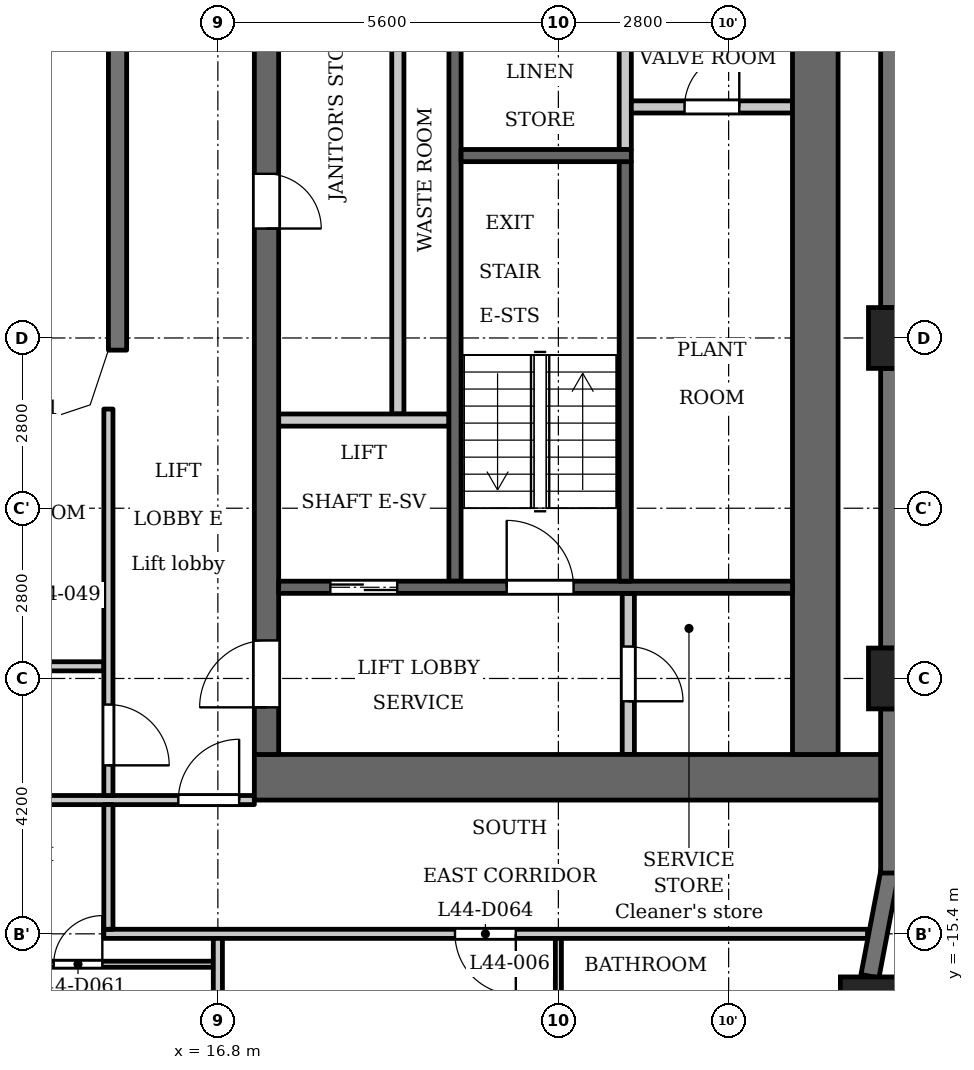
"""IFC4 building model, lengths in metres.
Left out: names, types, materials, properties, quantities, classifications, styles, units other than length and angle.
Written with IfcOpenShell. Run it as: python <this file> out.ifc"""

import sys

from ifc_helpers import new_model, si_unit, direction, frame, frame_2d, origin, origin_2d, place, context, subcontext, project, spatial, polyline, rectangle, outline, extrude, element, fill, save


model = new_model("IFC4")
c1 = context("Model", 3, precision=1e-05, world=origin(), true_north=direction((0.0, 1.0)))
c2 = subcontext(c1, "Body", "Model", "MODEL_VIEW")
j1 = project(units=[si_unit("LENGTHUNIT", "METRE"), si_unit("PLANEANGLEUNIT", "RADIAN")], contexts=[c1])
p1 = place(None, origin())
s1 = spatial("IfcSite", under=j1, at=p1, CompositionType="ELEMENT")
p2 = place(p1, origin())
s2 = spatial("IfcBuilding", under=s1, at=p2, CompositionType="ELEMENT")
p3 = place(p2, frame((0.0, 0.0, 171.1)))
s3 = spatial("IfcBuildingStorey", under=s2, at=p3, CompositionType="ELEMENT", Elevation=171.1)
for number, where, z_axis, x_axis in (
    (1, (27.538, -16.609, 0.0), (0.0, 0.0, 1.0), (1.0, 0.0, 0.0)),
    (2, (28.0, -11.2, 0.0), (0.0, 0.0, 1.0), (1.0, 0.0, 0.0)),
    (3, (28.0, -5.6, 0.0), (0.0, 0.0, 1.0), (1.0, 0.0, 0.0)),
):
    element("IfcColumn", number, at=place(p3, frame(where, z_axis=z_axis, x_axis=x_axis)), inside=s3, PredefinedType="COLUMN", context=c2, shape_type="SweptSolid", body=[
        extrude(rectangle(XDim=1.0, YDim=1.0, at=origin_2d()), origin(), (0.0, 0.0, 1.0), 3.5),
    ])
p4 = place(p3, frame((27.524, -16.097, 0.0), z_axis=(0.0, 0.0, 1.0), x_axis=(0.187259034321, 0.982310569049, 0.0)))
e4 = element("IfcWall", 4, at=p4, inside=s3, PredefinedType="SOLIDWALL", context=c2, shape_type="SweptSolid", body=[
    extrude(rectangle(XDim=1.756, YDim=0.3, at=frame_2d((0.878, 0.0))), origin(), (0.0, 0.0, 1.0), 2.45),
])
p5 = place(p3, frame((27.85, -14.4, 0.0), z_axis=(0.0, 0.0, 1.0), x_axis=(0.0, 1.0, 0.0)))
e5 = element("IfcWall", 5, at=p5, inside=s3, PredefinedType="SOLIDWALL", context=c2, shape_type="SweptSolid", body=[
    extrude(rectangle(XDim=2.7, YDim=0.3, at=frame_2d((1.35, 0.0))), origin(), (0.0, 0.0, 1.0), 2.45),
])
p6 = place(p3, frame((27.85, -10.7, 0.0), z_axis=(0.0, 0.0, 1.0), x_axis=(0.0, 1.0, 0.0)))
e6 = element("IfcWall", 6, at=p6, inside=s3, PredefinedType="SOLIDWALL", context=c2, shape_type="SweptSolid", body=[
    extrude(rectangle(XDim=4.6, YDim=0.3, at=frame_2d((2.3, 0.0))), origin(), (0.0, 0.0, 1.0), 2.45),
])
p7 = place(p3, frame((27.85, -5.1, 0.0), z_axis=(0.0, 0.0, 1.0), x_axis=(0.0, 1.0, 0.0)))
e7 = element("IfcWall", 7, at=p7, inside=s3, PredefinedType="SOLIDWALL", context=c2, shape_type="SweptSolid", body=[
    extrude(rectangle(XDim=4.6, YDim=0.3, at=frame_2d((2.3, 0.0))), origin(), (0.0, 0.0, 1.0), 2.45),
])
p8 = place(p3, frame((15.15, 5.8, 0.0), z_axis=(0.0, 0.0, 1.0), x_axis=(0.0, -1.0, 0.0)))
e8 = element("IfcWall", 8, at=p8, inside=s3, PredefinedType="SOLIDWALL", context=c2, shape_type="SweptSolid", body=[
    extrude(rectangle(XDim=11.6, YDim=0.3, at=frame_2d((5.8, 0.0))), origin(), (0.0, 0.0, 1.0), 3.2),
])
p9 = place(p3, frame((23.5, -2.5, 0.0), z_axis=(0.0, 0.0, 1.0), x_axis=(0.0, 1.0, 0.0)))
e9 = element("IfcWall", 9, at=p9, inside=s3, PredefinedType="PARTITIONING", context=c2, shape_type="SweptSolid", body=[
    extrude(rectangle(XDim=2.65, YDim=0.2, at=frame_2d((1.325, 0.0))), origin(), (0.0, 0.0, 1.0), 3.2),
])
p10 = place(p3, frame((20.7, -9.6, 0.0), z_axis=(0.0, 0.0, 1.0), x_axis=(0.0, 1.0, 0.0)))
e10 = element("IfcWall", 10, at=p10, inside=s3, PredefinedType="SHEAR", context=c2, shape_type="SweptSolid", body=[
    extrude(rectangle(XDim=9.75, YDim=0.2, at=frame_2d((4.875, 0.0))), origin(), (0.0, 0.0, 1.0), 3.2),
])
p11 = place(p3, frame((17.4, -12.825, 0.0), z_axis=(0.0, 0.0, 1.0), x_axis=(1.0, 0.0, 0.0)))
e11 = element("IfcWall", 11, at=p11, inside=s3, PredefinedType="SHEAR", context=c2, shape_type="SweptSolid", body=[
    extrude(rectangle(XDim=10.4, YDim=0.75, at=frame_2d((5.2, 0.0))), origin(), (0.0, 0.0, 1.0), 3.2),
])
p12 = place(p3, frame((19.76, -6.85, 0.0), z_axis=(0.0, 0.0, 1.0), x_axis=(0.0, 1.0, 0.0)))
e12 = element("IfcWall", 12, at=p12, inside=s3, PredefinedType="PARTITIONING", context=c2, shape_type="SweptSolid", body=[
    extrude(rectangle(XDim=7.0, YDim=0.2, at=frame_2d((3.5, 0.0))), origin(), (0.0, 0.0, 1.0), 3.2),
])
p13 = place(p3, frame((17.6, -12.45, 0.0), z_axis=(0.0, 0.0, 1.0), x_axis=(0.0, 1.0, 0.0)))
e13 = element("IfcWall", 13, at=p13, inside=s3, PredefinedType="SHEAR", context=c2, shape_type="SweptSolid", body=[
    extrude(rectangle(XDim=24.9, YDim=0.4, at=frame_2d((12.45, 0.0))), origin(), (0.0, 0.0, 1.0), 3.2),
])
p14 = place(p13, frame((8.65, 0.0, 0.0)))
e14 = element("IfcOpeningElement", 14, at=p14, cuts=e13, PredefinedType="OPENING", context=c2, shape_type="SweptSolid", body=[
    extrude(rectangle(XDim=0.9, YDim=2.1, at=frame_2d((0.45, 1.05))), frame((0.0, 0.21, 0.0), z_axis=(0.0, -1.0, 0.0), x_axis=(1.0, 0.0, 0.0)), (0.0, 0.0, 1.0), 0.42),
])
p15 = place(p13, frame((15.6, 0.0, 0.0)))
e15 = element("IfcOpeningElement", 15, at=p15, cuts=e13, PredefinedType="OPENING", context=c2, shape_type="SweptSolid", body=[
    extrude(rectangle(XDim=1.1, YDim=2.1, at=frame_2d((0.55, 1.05))), frame((0.0, 0.21, 0.0), z_axis=(0.0, -1.0, 0.0), x_axis=(1.0, 0.0, 0.0)), (0.0, 0.0, 1.0), 0.42),
])
p16 = place(p13, frame((18.0, 0.0, 0.0)))
e16 = element("IfcOpeningElement", 16, at=p16, cuts=e13, PredefinedType="OPENING", context=c2, shape_type="SweptSolid", body=[
    extrude(rectangle(XDim=1.1, YDim=2.1, at=frame_2d((0.55, 1.05))), frame((0.0, 0.21, 0.0), z_axis=(0.0, -1.0, 0.0), x_axis=(1.0, 0.0, 0.0)), (0.0, 0.0, 1.0), 0.42),
])
p17 = place(p13, frame((23.025, 0.0, 0.0)))
e17 = element("IfcOpeningElement", 17, at=p17, cuts=e13, PredefinedType="OPENING", context=c2, shape_type="SweptSolid", body=[
    extrude(rectangle(XDim=1.1, YDim=2.1, at=frame_2d((0.55, 1.05))), frame((0.0, 0.21, 0.0), z_axis=(0.0, -1.0, 0.0), x_axis=(1.0, 0.0, 0.0)), (0.0, 0.0, 1.0), 0.42),
])
p18 = place(p13, frame((0.775, 0.0, 0.0)))
e18 = element("IfcOpeningElement", 18, at=p18, cuts=e13, PredefinedType="OPENING", context=c2, shape_type="SweptSolid", body=[
    extrude(rectangle(XDim=1.1, YDim=2.1, at=frame_2d((0.55, 1.05))), frame((0.0, 0.21, 0.0), z_axis=(0.0, -1.0, 0.0), x_axis=(1.0, 0.0, 0.0)), (0.0, 0.0, 1.0), 0.42),
])
p19 = place(p13, frame((12.925, 0.0, 0.0)))
e19 = element("IfcOpeningElement", 19, at=p19, cuts=e13, PredefinedType="OPENING", context=c2, shape_type="SweptSolid", body=[
    extrude(rectangle(XDim=1.8, YDim=2.1, at=frame_2d((0.9, 1.05))), frame((0.0, 0.21, 0.0), z_axis=(0.0, -1.0, 0.0), x_axis=(1.0, 0.0, 0.0)), (0.0, 0.0, 1.0), 0.42),
])
p20 = place(p3, frame((26.625, -12.45, 0.0), z_axis=(0.0, 0.0, 1.0), x_axis=(0.0, 1.0, 0.0)))
e20 = element("IfcWall", 20, at=p20, inside=s3, PredefinedType="SHEAR", context=c2, shape_type="SweptSolid", body=[
    extrude(rectangle(XDim=24.9, YDim=0.75, at=frame_2d((12.45, 0.0))), origin(), (0.0, 0.0, 1.0), 3.2),
])
p21 = place(p3, frame((23.55, -12.45, 0.0), z_axis=(0.0, 0.0, 1.0), x_axis=(0.0, 1.0, 0.0)))
e21 = element("IfcWall", 21, at=p21, inside=s3, PredefinedType="PARTITIONING", context=c2, shape_type="SweptSolid", body=[
    extrude(rectangle(XDim=2.65, YDim=0.2, at=frame_2d((1.325, 0.0))), origin(), (0.0, 0.0, 1.0), 3.2),
])
p22 = place(p21, frame((0.875, 0.0, 0.0)))
e22 = element("IfcOpeningElement", 22, at=p22, cuts=e21, PredefinedType="OPENING", context=c2, shape_type="SweptSolid", body=[
    extrude(rectangle(XDim=0.9, YDim=2.1, at=frame_2d((0.45, 1.05))), frame((0.0, 0.11, 0.0), z_axis=(0.0, -1.0, 0.0), x_axis=(1.0, 0.0, 0.0)), (0.0, 0.0, 1.0), 0.22),
])
p23 = place(p3, frame((23.6, -1.8, 0.0), z_axis=(0.0, 0.0, 1.0), x_axis=(1.0, 0.0, 0.0)))
e23 = element("IfcWall", 23, at=p23, inside=s3, PredefinedType="PARTITIONING", context=c2, shape_type="SweptSolid", body=[
    extrude(rectangle(XDim=2.65, YDim=0.2, at=frame_2d((1.325, 0.0))), origin(), (0.0, 0.0, 1.0), 3.2),
])
p24 = place(p23, frame((0.875, 0.0, 0.0)))
e24 = element("IfcOpeningElement", 24, at=p24, cuts=e23, PredefinedType="OPENING", context=c2, shape_type="SweptSolid", body=[
    extrude(rectangle(XDim=0.9, YDim=2.1, at=frame_2d((0.45, 1.05))), frame((0.0, 0.11, 0.0), z_axis=(0.0, -1.0, 0.0), x_axis=(1.0, 0.0, 0.0)), (0.0, 0.0, 1.0), 0.22),
])
p25 = place(p3, frame((17.8, -9.7, 0.0), z_axis=(0.0, 0.0, 1.0), x_axis=(1.0, 0.0, 0.0)))
e25 = element("IfcWall", 25, at=p25, inside=s3, PredefinedType="SHEAR", context=c2, shape_type="SweptSolid", body=[
    extrude(rectangle(XDim=8.45, YDim=0.2, at=frame_2d((4.225, 0.0))), origin(), (0.0, 0.0, 1.0), 3.2),
])
p26 = place(p25, frame((0.85, 0.0, 0.0)))
e26 = element("IfcOpeningElement", 26, at=p26, cuts=e25, PredefinedType="OPENING", context=c2, shape_type="SweptSolid", body=[
    extrude(rectangle(XDim=1.1, YDim=2.1, at=frame_2d((0.55, 1.05))), frame((0.0, 0.11, 0.0), z_axis=(0.0, -1.0, 0.0), x_axis=(1.0, 0.0, 0.0)), (0.0, 0.0, 1.0), 0.22),
])
p27 = place(p25, frame((3.75, 0.0, 0.0)))
e27 = element("IfcOpeningElement", 27, at=p27, cuts=e25, PredefinedType="OPENING", context=c2, shape_type="SweptSolid", body=[
    extrude(rectangle(XDim=1.1, YDim=2.1, at=frame_2d((0.55, 1.05))), frame((0.0, 0.11, 0.0), z_axis=(0.0, -1.0, 0.0), x_axis=(1.0, 0.0, 0.0)), (0.0, 0.0, 1.0), 0.22),
])
p28 = place(p3, frame((17.8, -6.95, 0.0), z_axis=(0.0, 0.0, 1.0), x_axis=(1.0, 0.0, 0.0)))
e28 = element("IfcWall", 28, at=p28, inside=s3, PredefinedType="PARTITIONING", context=c2, shape_type="SweptSolid", body=[
    extrude(rectangle(XDim=2.8, YDim=0.2, at=frame_2d((1.4, 0.0))), origin(), (0.0, 0.0, 1.0), 3.2),
])
p29 = place(p3, frame((23.5, -9.6, 0.0), z_axis=(0.0, 0.0, 1.0), x_axis=(0.0, 1.0, 0.0)))
e29 = element("IfcWall", 29, at=p29, inside=s3, PredefinedType="SHEAR", context=c2, shape_type="SweptSolid", body=[
    extrude(rectangle(XDim=6.9, YDim=0.2, at=frame_2d((3.45, 0.0))), origin(), (0.0, 0.0, 1.0), 3.2),
])
p30 = place(p3, frame((20.8, -2.6, 0.0), z_axis=(0.0, 0.0, 1.0), x_axis=(1.0, 0.0, 0.0)))
e30 = element("IfcWall", 30, at=p30, inside=s3, PredefinedType="SHEAR", context=c2, shape_type="SweptSolid", body=[
    extrude(rectangle(XDim=2.8, YDim=0.2, at=frame_2d((1.4, 0.0))), origin(), (0.0, 0.0, 1.0), 3.2),
])
p31 = place(p3, frame((-16.725, -15.9, 0.0), z_axis=(0.0, 0.0, 1.0), x_axis=(1.0, 0.0, 0.0)))
e31 = element("IfcWall", 31, at=p31, inside=s3, PredefinedType="PARTITIONING", context=c2, shape_type="SweptSolid", body=[
    extrude(rectangle(XDim=33.45, YDim=0.1, at=frame_2d((16.725, 0.0))), origin(), (0.0, 0.0, 1.0), 3.2),
])
p32 = place(p31, frame((9.675, 0.0, 0.0)))
e32 = element("IfcOpeningElement", 32, at=p32, cuts=e31, PredefinedType="OPENING", context=c2, shape_type="SweptSolid", body=[
    extrude(rectangle(XDim=0.8, YDim=2.1, at=frame_2d((0.4, 1.05))), frame((0.0, 0.06, 0.0), z_axis=(0.0, -1.0, 0.0), x_axis=(1.0, 0.0, 0.0)), (0.0, 0.0, 1.0), 0.12),
])
p33 = place(p31, frame((4.075, 0.0, 0.0)))
e33 = element("IfcOpeningElement", 33, at=p33, cuts=e31, PredefinedType="OPENING", context=c2, shape_type="SweptSolid", body=[
    extrude(rectangle(XDim=0.9, YDim=2.1, at=frame_2d((0.45, 1.05))), frame((0.0, 0.06, 0.0), z_axis=(0.0, -1.0, 0.0), x_axis=(1.0, 0.0, 0.0)), (0.0, 0.0, 1.0), 0.12),
])
p34 = place(p31, frame((20.875, 0.0, 0.0)))
e34 = element("IfcOpeningElement", 34, at=p34, cuts=e31, PredefinedType="OPENING", context=c2, shape_type="SweptSolid", body=[
    extrude(rectangle(XDim=0.8, YDim=2.1, at=frame_2d((0.4, 1.05))), frame((0.0, 0.06, 0.0), z_axis=(0.0, -1.0, 0.0), x_axis=(1.0, 0.0, 0.0)), (0.0, 0.0, 1.0), 0.12),
])
p35 = place(p31, frame((15.275, 0.0, 0.0)))
e35 = element("IfcOpeningElement", 35, at=p35, cuts=e31, PredefinedType="OPENING", context=c2, shape_type="SweptSolid", body=[
    extrude(rectangle(XDim=0.9, YDim=2.1, at=frame_2d((0.45, 1.05))), frame((0.0, 0.06, 0.0), z_axis=(0.0, -1.0, 0.0), x_axis=(1.0, 0.0, 0.0)), (0.0, 0.0, 1.0), 0.12),
])
p36 = place(p31, frame((30.825, 0.0, 0.0)))
e36 = element("IfcOpeningElement", 36, at=p36, cuts=e31, PredefinedType="OPENING", context=c2, shape_type="SweptSolid", body=[
    extrude(rectangle(XDim=0.8, YDim=2.1, at=frame_2d((0.4, 1.05))), frame((0.0, 0.06, 0.0), z_axis=(0.0, -1.0, 0.0), x_axis=(1.0, 0.0, 0.0)), (0.0, 0.0, 1.0), 0.12),
])
p37 = place(p31, frame((26.475, 0.0, 0.0)))
e37 = element("IfcOpeningElement", 37, at=p37, cuts=e31, PredefinedType="OPENING", context=c2, shape_type="SweptSolid", body=[
    extrude(rectangle(XDim=0.9, YDim=2.1, at=frame_2d((0.45, 1.05))), frame((0.0, 0.06, 0.0), z_axis=(0.0, -1.0, 0.0), x_axis=(1.0, 0.0, 0.0)), (0.0, 0.0, 1.0), 0.12),
])
p38 = place(p3, frame((14.925, -15.4, 0.0), z_axis=(0.0, 0.0, 1.0), x_axis=(1.0, 0.0, 0.0)))
e38 = element("IfcWall", 38, at=p38, inside=s3, PredefinedType="PARTITIONING", context=c2, shape_type="SweptSolid", body=[
    extrude(rectangle(XDim=12.559, YDim=0.15, at=frame_2d((6.279, 0.0))), origin(), (0.0, 0.0, 1.0), 3.2),
])
p39 = place(p38, frame((5.775, 0.0, 0.0)))
e39 = element("IfcOpeningElement", 39, at=p39, cuts=e38, PredefinedType="OPENING", context=c2, shape_type="SweptSolid", body=[
    extrude(rectangle(XDim=1.0, YDim=2.1, at=frame_2d((0.5, 1.05))), frame((0.0, 0.085, 0.0), z_axis=(0.0, -1.0, 0.0), x_axis=(1.0, 0.0, 0.0)), (0.0, 0.0, 1.0), 0.17),
])
p40 = place(p3, frame((-17.4, -13.2, 0.0), z_axis=(0.0, 0.0, 1.0), x_axis=(1.0, 0.0, 0.0)))
e40 = element("IfcWall", 40, at=p40, inside=s3, PredefinedType="PARTITIONING", context=c2, shape_type="SweptSolid", body=[
    extrude(rectangle(XDim=34.8, YDim=0.15, at=frame_2d((17.4, 0.0))), origin(), (0.0, 0.0, 1.0), 3.2),
])
p41 = place(p40, frame((0.15, 0.0, 0.0)))
e41 = element("IfcOpeningElement", 41, at=p41, cuts=e40, PredefinedType="OPENING", context=c2, shape_type="SweptSolid", body=[
    extrude(rectangle(XDim=1.0, YDim=2.1, at=frame_2d((0.5, 1.05))), frame((0.0, 0.085, 0.0), z_axis=(0.0, -1.0, 0.0), x_axis=(1.0, 0.0, 0.0)), (0.0, 0.0, 1.0), 0.17),
])
p42 = place(p40, frame((33.55, 0.0, 0.0)))
e42 = element("IfcOpeningElement", 42, at=p42, cuts=e40, PredefinedType="OPENING", context=c2, shape_type="SweptSolid", body=[
    extrude(rectangle(XDim=1.0, YDim=2.1, at=frame_2d((0.5, 1.05))), frame((0.0, 0.085, 0.0), z_axis=(0.0, -1.0, 0.0), x_axis=(1.0, 0.0, 0.0)), (0.0, 0.0, 1.0), 0.17),
])
p43 = place(p40, frame((15.7, 0.0, 0.0)))
e43 = element("IfcOpeningElement", 43, at=p43, cuts=e40, PredefinedType="OPENING", context=c2, shape_type="SweptSolid", body=[
    extrude(rectangle(XDim=1.0, YDim=2.1, at=frame_2d((0.5, 1.05))), frame((0.0, 0.085, 0.0), z_axis=(0.0, -1.0, 0.0), x_axis=(1.0, 0.0, 0.0)), (0.0, 0.0, 1.0), 0.17),
])
p44 = place(p40, frame((26.9, 0.0, 0.0)))
e44 = element("IfcOpeningElement", 44, at=p44, cuts=e40, PredefinedType="OPENING", context=c2, shape_type="SweptSolid", body=[
    extrude(rectangle(XDim=1.0, YDim=2.1, at=frame_2d((0.5, 1.05))), frame((0.0, 0.085, 0.0), z_axis=(0.0, -1.0, 0.0), x_axis=(1.0, 0.0, 0.0)), (0.0, 0.0, 1.0), 0.17),
])
p45 = place(p3, frame((-14.925, -11.0, 0.0), z_axis=(0.0, 0.0, 1.0), x_axis=(1.0, 0.0, 0.0)))
e45 = element("IfcWall", 45, at=p45, inside=s3, PredefinedType="PARTITIONING", context=c2, shape_type="SweptSolid", body=[
    extrude(rectangle(XDim=29.85, YDim=0.15, at=frame_2d((14.925, 0.0))), origin(), (0.0, 0.0, 1.0), 3.2),
])
p46 = place(p45, frame((9.875, 0.0, 0.0)))
e46 = element("IfcOpeningElement", 46, at=p46, cuts=e45, PredefinedType="OPENING", context=c2, shape_type="SweptSolid", body=[
    extrude(rectangle(XDim=1.0, YDim=2.1, at=frame_2d((0.5, 1.05))), frame((0.0, 0.085, 0.0), z_axis=(0.0, -1.0, 0.0), x_axis=(1.0, 0.0, 0.0)), (0.0, 0.0, 1.0), 0.17),
])
p47 = place(p45, frame((17.875, 0.0, 0.0)))
e47 = element("IfcOpeningElement", 47, at=p47, cuts=e45, PredefinedType="OPENING", context=c2, shape_type="SweptSolid", body=[
    extrude(rectangle(XDim=1.0, YDim=2.1, at=frame_2d((0.5, 1.05))), frame((0.0, 0.085, 0.0), z_axis=(0.0, -1.0, 0.0), x_axis=(1.0, 0.0, 0.0)), (0.0, 0.0, 1.0), 0.17),
])
p48 = place(p3, frame((15.0, -15.325, 0.0), z_axis=(0.0, 0.0, 1.0), x_axis=(0.0, 1.0, 0.0)))
e48 = element("IfcWall", 48, at=p48, inside=s3, PredefinedType="PARTITIONING", context=c2, shape_type="SweptSolid", body=[
    extrude(rectangle(XDim=2.05, YDim=0.15, at=frame_2d((1.025, 0.0))), origin(), (0.0, 0.0, 1.0), 3.2),
])
p49 = place(p3, frame((15.0, -13.125, 0.0), z_axis=(0.0, 0.0, 1.0), x_axis=(0.0, 1.0, 0.0)))
e49 = element("IfcWall", 49, at=p49, inside=s3, PredefinedType="PARTITIONING", context=c2, shape_type="SweptSolid", body=[
    extrude(rectangle(XDim=6.356, YDim=0.15, at=frame_2d((3.178, 0.0))), origin(), (0.0, 0.0, 1.0), 3.2),
])
p50 = place(p49, frame((0.496, 0.0, 0.0)))
e50 = element("IfcOpeningElement", 50, at=p50, cuts=e49, PredefinedType="OPENING", context=c2, shape_type="SweptSolid", body=[
    extrude(rectangle(XDim=1.0, YDim=2.1, at=frame_2d((0.5, 1.05))), frame((0.0, 0.085, 0.0), z_axis=(0.0, -1.0, 0.0), x_axis=(1.0, 0.0, 0.0)), (0.0, 0.0, 1.0), 0.17),
])
p51 = place(p3, frame((16.8, -22.88, 0.0), z_axis=(0.0, 0.0, 1.0), x_axis=(0.0, 1.0, 0.0)))
e51 = element("IfcWall", 51, at=p51, inside=s3, PredefinedType="PARTITIONING", context=c2, shape_type="SweptSolid", body=[
    extrude(rectangle(XDim=7.405, YDim=0.15, at=frame_2d((3.702, 0.0))), origin(), (0.0, 0.0, 1.0), 3.2),
])
p52 = place(p3, frame((22.4, -18.05, 0.0), z_axis=(0.0, 0.0, 1.0), x_axis=(0.0, 1.0, 0.0)))
e52 = element("IfcWall", 52, at=p52, inside=s3, PredefinedType="PARTITIONING", context=c2, shape_type="SweptSolid", body=[
    extrude(rectangle(XDim=2.575, YDim=0.1, at=frame_2d((1.288, 0.0))), origin(), (0.0, 0.0, 1.0), 3.2),
])
p53 = place(p3, origin())
e53 = element("IfcWall", 53, at=p53, inside=s3, PredefinedType="SOLIDWALL", context=c2, shape_type="SweptSolid", body=[
    extrude(outline(polyline([(14.937, -6.937), (15.3, -5.849), (15.3, -5.8), (15.0, -5.8), (14.7, -6.7), (13.8, -7.0), (13.8, -7.3), (13.849, -7.3), (14.937, -6.937)])), origin(), (0.0, 0.0, 1.0), 3.2),
])
p54 = place(p26, origin())
e54 = element("IfcDoor", 54, at=p54, inside=s3, OperationType="DOUBLE_DOOR_SLIDING", PredefinedType="DOOR", context=c2, shape_type="SweptSolid", body=[
    extrude(rectangle(XDim=1.1, YDim=2.1, at=frame_2d((0.55, 1.05))), frame((0.0, 0.025, 0.0), z_axis=(0.0, -1.0, 0.0), x_axis=(1.0, 0.0, 0.0)), (0.0, 0.0, 1.0), 0.05),
])
fill(e26, e54)
p55 = place(p14, origin())
e55 = element("IfcDoor", 55, at=p55, inside=s3, OperationType="SINGLE_SWING_LEFT", PredefinedType="DOOR", context=c2, shape_type="SweptSolid", body=[
    extrude(rectangle(XDim=0.9, YDim=2.1, at=frame_2d((0.45, 1.05))), frame((0.0, 0.025, 0.0), z_axis=(0.0, -1.0, 0.0), x_axis=(1.0, 0.0, 0.0)), (0.0, 0.0, 1.0), 0.05),
])
fill(e14, e55)
p56 = place(p18, origin())
e56 = element("IfcDoor", 56, at=p56, inside=s3, OperationType="SINGLE_SWING_RIGHT", PredefinedType="DOOR", context=c2, shape_type="SweptSolid", body=[
    extrude(rectangle(XDim=1.1, YDim=2.1, at=frame_2d((0.55, 1.05))), frame((0.0, 0.025, 0.0), z_axis=(0.0, -1.0, 0.0), x_axis=(1.0, 0.0, 0.0)), (0.0, 0.0, 1.0), 0.05),
])
fill(e18, e56)
p57 = place(p22, origin())
e57 = element("IfcDoor", 57, at=p57, inside=s3, OperationType="SINGLE_SWING_LEFT", PredefinedType="DOOR", context=c2, shape_type="SweptSolid", body=[
    extrude(rectangle(XDim=0.9, YDim=2.1, at=frame_2d((0.45, 1.05))), frame((0.0, 0.025, 0.0), z_axis=(0.0, -1.0, 0.0), x_axis=(1.0, 0.0, 0.0)), (0.0, 0.0, 1.0), 0.05),
])
fill(e22, e57)
p58 = place(p27, origin())
e58 = element("IfcDoor", 58, at=p58, inside=s3, OperationType="SINGLE_SWING_RIGHT", PredefinedType="DOOR", context=c2, shape_type="SweptSolid", body=[
    extrude(rectangle(XDim=1.1, YDim=2.1, at=frame_2d((0.55, 1.05))), frame((0.0, 0.025, 0.0), z_axis=(0.0, -1.0, 0.0), x_axis=(1.0, 0.0, 0.0)), (0.0, 0.0, 1.0), 0.05),
])
fill(e27, e58)
p59 = place(p24, origin())
e59 = element("IfcDoor", 59, at=p59, inside=s3, OperationType="SINGLE_SWING_LEFT", PredefinedType="DOOR", context=c2, shape_type="SweptSolid", body=[
    extrude(rectangle(XDim=0.9, YDim=2.1, at=frame_2d((0.45, 1.05))), frame((0.0, 0.025, 0.0), z_axis=(0.0, -1.0, 0.0), x_axis=(1.0, 0.0, 0.0)), (0.0, 0.0, 1.0), 0.05),
])
fill(e24, e59)
p60 = place(p50, origin())
e60 = element("IfcDoor", 60, at=p60, inside=s3, OperationType="SINGLE_SWING_LEFT", PredefinedType="DOOR", context=c2, shape_type="SweptSolid", body=[
    extrude(rectangle(XDim=1.0, YDim=2.1, at=frame_2d((0.5, 1.05))), frame((0.0, 0.025, 0.0), z_axis=(0.0, -1.0, 0.0), x_axis=(1.0, 0.0, 0.0)), (0.0, 0.0, 1.0), 0.05),
])
fill(e50, e60)
p61 = place(p42, origin())
e61 = element("IfcDoor", 61, at=p61, inside=s3, OperationType="SINGLE_SWING_LEFT", PredefinedType="DOOR", context=c2, shape_type="SweptSolid", body=[
    extrude(rectangle(XDim=1.0, YDim=2.1, at=frame_2d((0.5, 1.05))), frame((0.0, 0.025, 0.0), z_axis=(0.0, -1.0, 0.0), x_axis=(1.0, 0.0, 0.0)), (0.0, 0.0, 1.0), 0.05),
])
fill(e42, e61)
p62 = place(p36, origin())
e62 = element("IfcDoor", 62, at=p62, inside=s3, OperationType="SINGLE_SWING_LEFT", PredefinedType="DOOR", context=c2, shape_type="SweptSolid", body=[
    extrude(rectangle(XDim=0.8, YDim=2.1, at=frame_2d((0.4, 1.05))), frame((0.0, 0.025, 0.0), z_axis=(0.0, -1.0, 0.0), x_axis=(1.0, 0.0, 0.0)), (0.0, 0.0, 1.0), 0.05),
])
fill(e36, e62)
p63 = place(p39, origin())
e63 = element("IfcDoor", 63, at=p63, inside=s3, OperationType="SINGLE_SWING_RIGHT", PredefinedType="DOOR", context=c2, shape_type="SweptSolid", body=[
    extrude(rectangle(XDim=1.0, YDim=2.1, at=frame_2d((0.5, 1.05))), frame((0.0, 0.025, 0.0), z_axis=(0.0, -1.0, 0.0), x_axis=(1.0, 0.0, 0.0)), (0.0, 0.0, 1.0), 0.05),
])
fill(e39, e63)
save(model, sys.argv[1])
